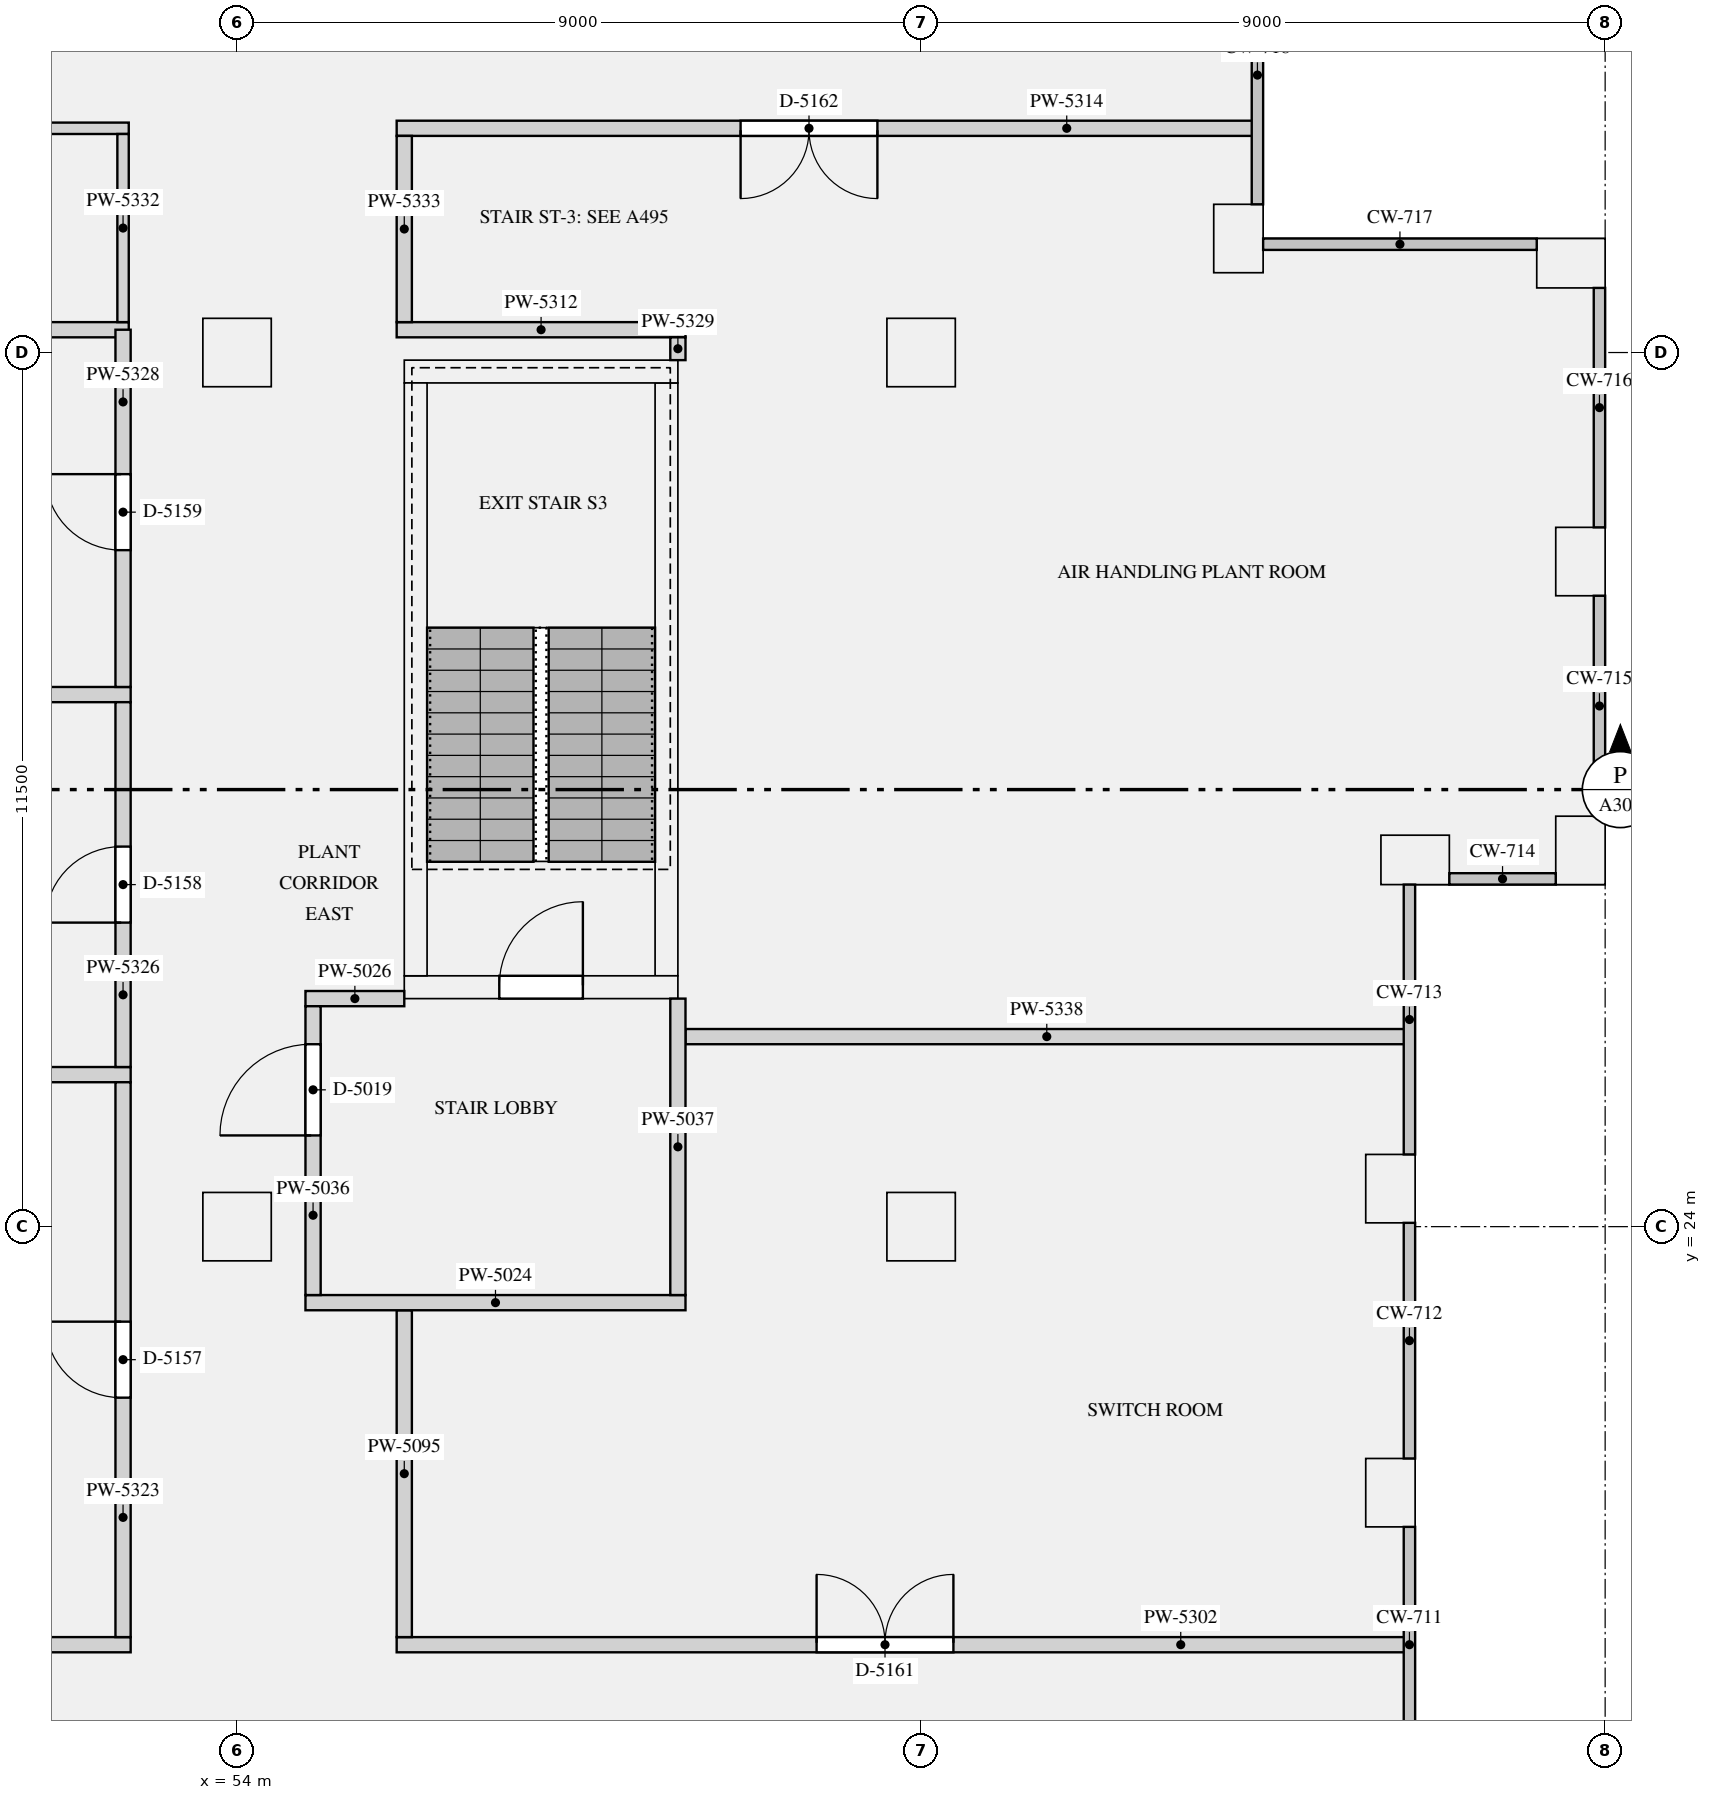
"""IFC4 building model, lengths in metres.
Left out: names, types, materials, properties, quantities, classifications, styles, units other than length and angle.
Written with IfcOpenShell. Run it as: python <this file> out.ifc"""

import sys

from ifc_helpers import new_model, si_unit, direction, frame, frame_2d, origin, origin_2d, place, context, subcontext, project, spatial, rectangle, extrude, element, fill, save


model = new_model("IFC4")
c1 = context("Model", 3, precision=1e-05, world=origin(), true_north=direction((0.0, 1.0)))
c2 = subcontext(c1, "Body", "Model", "MODEL_VIEW")
j1 = project(units=[si_unit("LENGTHUNIT", "METRE"), si_unit("PLANEANGLEUNIT", "RADIAN")], contexts=[c1])
p1 = place(None, origin())
s1 = spatial("IfcSite", under=j1, at=p1, CompositionType="ELEMENT")
p2 = place(p1, origin())
s2 = spatial("IfcBuilding", under=s1, at=p2, CompositionType="ELEMENT")
p3 = place(p2, frame((0.0, 0.0, 240.0)))
s3 = spatial("IfcBuildingStorey", under=s2, at=p3, CompositionType="ELEMENT", Elevation=240.0)
for number, where, z_axis, x_axis in (
    (1, (69.175, 20.5, 0.0), (0.0, 0.0, 1.0), (0.0, 1.0, 0.0)),
    (2, (69.175, 24.5, 0.0), (0.0, 0.0, 1.0), (0.0, 1.0, 0.0)),
    (3, (69.5, 28.825, 0.0), (0.0, 0.0, 1.0), (1.0, 0.0, 0.0)),
    (4, (71.675, 28.95, 0.0), (0.0, 0.0, 1.0), (0.0, 1.0, 0.0)),
    (5, (71.675, 32.75, 0.0), (0.0, 0.0, 1.0), (0.0, 1.0, 0.0)),
    (6, (71.55, 36.675, 0.0), (0.0, 0.0, 1.0), (-1.0, 0.0, 0.0)),
    (7, (67.175, 37.0, 0.0), (0.0, 0.0, 1.0), (0.0, 1.0, 0.0)),
):
    element("IfcColumn", number, at=place(p3, frame(where, z_axis=z_axis, x_axis=x_axis)), inside=s3, PredefinedType="USERDEFINED", context=c2, shape_type="SweptSolid", body=[
        extrude(rectangle(XDim=0.9, YDim=0.65, at=origin_2d()), origin(), (0.0, 0.0, 1.0), 4.2),
    ])
for number, where, z_axis, x_axis in (
    (8, (54.0, 24.0, 0.0), (0.0, 0.0, 1.0), (1.0, 0.0, 0.0)),
    (9, (63.0, 24.0, 0.0), (0.0, 0.0, 1.0), (1.0, 0.0, 0.0)),
    (10, (54.0, 35.5, 0.0), (0.0, 0.0, 1.0), (1.0, 0.0, 0.0)),
    (11, (63.0, 35.5, 0.0), (0.0, 0.0, 1.0), (1.0, 0.0, 0.0)),
):
    element("IfcColumn", number, at=place(p3, frame(where, z_axis=z_axis, x_axis=x_axis)), inside=s3, PredefinedType="COLUMN", context=c2, shape_type="SweptSolid", body=[
        extrude(rectangle(XDim=0.9, YDim=0.9, at=origin_2d()), origin(), (0.0, 0.0, 1.0), 4.2),
    ])
p4 = place(p3, frame((56.2, 27.15, 0.0), z_axis=(0.0, 0.0, 1.0), x_axis=(1.0, 0.0, 0.0)))
e12 = element("IfcWall", 12, at=p4, inside=s3, PredefinedType="SHEAR", context=c2, shape_type="SweptSolid", body=[
    extrude(rectangle(XDim=3.6, YDim=0.3, at=frame_2d((1.8, 0.0))), origin(), (0.0, 0.0, 1.0), 4.2),
])
p5 = place(p4, frame((1.25, 0.0, 0.0)))
e13 = element("IfcOpeningElement", 13, at=p5, cuts=e12, PredefinedType="OPENING", context=c2, shape_type="SweptSolid", body=[
    extrude(rectangle(XDim=1.1, YDim=2.1, at=frame_2d((0.55, 1.05))), frame((0.0, 0.16, 0.0), z_axis=(0.0, -1.0, 0.0), x_axis=(1.0, 0.0, 0.0)), (0.0, 0.0, 1.0), 0.32),
])
p6 = place(p3, frame((56.2, 35.25, 0.0), z_axis=(0.0, 0.0, 1.0), x_axis=(1.0, 0.0, 0.0)))
e14 = element("IfcWall", 14, at=p6, inside=s3, PredefinedType="SHEAR", context=c2, shape_type="SweptSolid", body=[
    extrude(rectangle(XDim=3.6, YDim=0.3, at=frame_2d((1.8, 0.0))), origin(), (0.0, 0.0, 1.0), 4.2),
])
for number, where, z_axis, x_axis in (
    (15, (56.35, 27.3, 0.0), (0.0, 0.0, 1.0), (0.0, 1.0, 0.0)),
    (16, (59.65, 27.3, 0.0), (0.0, 0.0, 1.0), (0.0, 1.0, 0.0)),
):
    element("IfcWall", number, at=place(p3, frame(where, z_axis=z_axis, x_axis=x_axis)), inside=s3, PredefinedType="SHEAR", context=c2, shape_type="SweptSolid", body=[
        extrude(rectangle(XDim=7.8, YDim=0.3, at=frame_2d((3.9, 0.0))), origin(), (0.0, 0.0, 1.0), 4.2),
    ])
p7 = place(p3, frame((54.9, 23.0, 0.0), z_axis=(0.0, 0.0, 1.0), x_axis=(1.0, 0.0, 0.0)))
e17 = element("IfcWall", 17, at=p7, inside=s3, PredefinedType="PARTITIONING", context=c2, shape_type="SweptSolid", body=[
    extrude(rectangle(XDim=5.0, YDim=0.2, at=frame_2d((2.5, 0.0))), origin(), (0.0, 0.0, 1.0), 3.85),
])
p8 = place(p3, frame((54.9, 27.0, 0.0), z_axis=(0.0, 0.0, 1.0), x_axis=(1.0, 0.0, 0.0)))
e18 = element("IfcWall", 18, at=p8, inside=s3, PredefinedType="PARTITIONING", context=c2, shape_type="SweptSolid", body=[
    extrude(rectangle(XDim=1.3, YDim=0.2, at=frame_2d((0.65, 0.0))), origin(), (0.0, 0.0, 1.0), 3.85),
])
p9 = place(p3, frame((55.0, 23.1, 0.0), z_axis=(0.0, 0.0, 1.0), x_axis=(0.0, 1.0, 0.0)))
e19 = element("IfcWall", 19, at=p9, inside=s3, PredefinedType="PARTITIONING", context=c2, shape_type="SweptSolid", body=[
    extrude(rectangle(XDim=3.8, YDim=0.2, at=frame_2d((1.9, 0.0))), origin(), (0.0, 0.0, 1.0), 3.85),
])
p10 = place(p9, frame((2.1, 0.0, 0.0)))
e20 = element("IfcOpeningElement", 20, at=p10, cuts=e19, PredefinedType="OPENING", context=c2, shape_type="SweptSolid", body=[
    extrude(rectangle(XDim=1.2, YDim=2.1, at=frame_2d((0.6, 1.05))), frame((0.0, 0.11, 0.0), z_axis=(0.0, -1.0, 0.0), x_axis=(1.0, 0.0, 0.0)), (0.0, 0.0, 1.0), 0.22),
])
p11 = place(p3, frame((59.8, 23.1, 0.0), z_axis=(0.0, 0.0, 1.0), x_axis=(0.0, 1.0, 0.0)))
e21 = element("IfcWall", 21, at=p11, inside=s3, PredefinedType="PARTITIONING", context=c2, shape_type="SweptSolid", body=[
    extrude(rectangle(XDim=3.9, YDim=0.2, at=frame_2d((1.95, 0.0))), origin(), (0.0, 0.0, 1.0), 3.85),
])
p12 = place(p3, frame((26.7, 18.5, 0.0), z_axis=(0.0, 0.0, 1.0), x_axis=(1.0, 0.0, 0.0)))
e22 = element("IfcWall", 22, at=p12, inside=s3, PredefinedType="PARTITIONING", context=c2, shape_type="SweptSolid", body=[
    extrude(rectangle(XDim=25.9, YDim=0.2, at=frame_2d((12.95, 0.0))), origin(), (0.0, 0.0, 1.0), 3.85),
])
p13 = place(p12, frame((5.2, 0.0, 0.0)))
e23 = element("IfcOpeningElement", 23, at=p13, cuts=e22, PredefinedType="OPENING", context=c2, shape_type="SweptSolid", body=[
    extrude(rectangle(XDim=1.0, YDim=2.1, at=frame_2d((0.5, 1.05))), frame((0.0, 0.11, 0.0), z_axis=(0.0, -1.0, 0.0), x_axis=(1.0, 0.0, 0.0)), (0.0, 0.0, 1.0), 0.22),
])
p14 = place(p12, frame((14.4, 0.0, 0.0)))
e24 = element("IfcOpeningElement", 24, at=p14, cuts=e22, PredefinedType="OPENING", context=c2, shape_type="SweptSolid", body=[
    extrude(rectangle(XDim=1.0, YDim=2.1, at=frame_2d((0.5, 1.05))), frame((0.0, 0.11, 0.0), z_axis=(0.0, -1.0, 0.0), x_axis=(1.0, 0.0, 0.0)), (0.0, 0.0, 1.0), 0.22),
])
p15 = place(p3, frame((56.1, 18.5, 0.0), z_axis=(0.0, 0.0, 1.0), x_axis=(1.0, 0.0, 0.0)))
e25 = element("IfcWall", 25, at=p15, inside=s3, PredefinedType="PARTITIONING", context=c2, shape_type="SweptSolid", body=[
    extrude(rectangle(XDim=13.307, YDim=0.2, at=frame_2d((6.653, 0.0))), origin(), (0.0, 0.0, 1.0), 3.85),
])
p16 = place(p15, frame((5.525, 0.0, 0.0)))
e26 = element("IfcOpeningElement", 26, at=p16, cuts=e25, PredefinedType="OPENING", context=c2, shape_type="SweptSolid", body=[
    extrude(rectangle(XDim=1.8, YDim=2.1, at=frame_2d((0.9, 1.05))), frame((0.0, 0.11, 0.0), z_axis=(0.0, -1.0, 0.0), x_axis=(1.0, 0.0, 0.0)), (0.0, 0.0, 1.0), 0.22),
])
p17 = place(p3, frame((45.096, 26.0, 0.0), z_axis=(0.0, 0.0, 1.0), x_axis=(1.0, 0.0, 0.0)))
e27 = element("IfcWall", 27, at=p17, inside=s3, PredefinedType="PARTITIONING", context=c2, shape_type="SweptSolid", body=[
    extrude(rectangle(XDim=7.504, YDim=0.2, at=frame_2d((3.752, 0.0))), origin(), (0.0, 0.0, 1.0), 3.85),
])
p18 = place(p3, frame((59.9, 26.5, 0.0), z_axis=(0.0, 0.0, 1.0), x_axis=(1.0, 0.0, 0.0)))
e28 = element("IfcWall", 28, at=p18, inside=s3, PredefinedType="PARTITIONING", context=c2, shape_type="SweptSolid", body=[
    extrude(rectangle(XDim=9.507, YDim=0.2, at=frame_2d((4.753, 0.0))), origin(), (0.0, 0.0, 1.0), 3.85),
])
p19 = place(p3, frame((45.096, 31.0, 0.0), z_axis=(0.0, 0.0, 1.0), x_axis=(1.0, 0.0, 0.0)))
e29 = element("IfcWall", 29, at=p19, inside=s3, PredefinedType="PARTITIONING", context=c2, shape_type="SweptSolid", body=[
    extrude(rectangle(XDim=7.504, YDim=0.2, at=frame_2d((3.752, 0.0))), origin(), (0.0, 0.0, 1.0), 3.85),
])
p20 = place(p3, frame((45.3, 35.8, 0.0), z_axis=(0.0, 0.0, 1.0), x_axis=(1.0, 0.0, 0.0)))
e30 = element("IfcWall", 30, at=p20, inside=s3, PredefinedType="PARTITIONING", context=c2, shape_type="SweptSolid", body=[
    extrude(rectangle(XDim=7.275, YDim=0.2, at=frame_2d((3.637, 0.0))), origin(), (0.0, 0.0, 1.0), 3.85),
])
p21 = place(p3, frame((56.1, 35.8, 0.0), z_axis=(0.0, 0.0, 1.0), x_axis=(1.0, 0.0, 0.0)))
e31 = element("IfcWall", 31, at=p21, inside=s3, PredefinedType="PARTITIONING", context=c2, shape_type="SweptSolid", body=[
    extrude(rectangle(XDim=3.8, YDim=0.2, at=frame_2d((1.9, 0.0))), origin(), (0.0, 0.0, 1.0), 3.85),
])
p22 = place(p3, frame((56.1, 38.45, 0.0), z_axis=(0.0, 0.0, 1.0), x_axis=(1.0, 0.0, 0.0)))
e32 = element("IfcWall", 32, at=p22, inside=s3, PredefinedType="PARTITIONING", context=c2, shape_type="SweptSolid", body=[
    extrude(rectangle(XDim=11.307, YDim=0.2, at=frame_2d((5.653, 0.0))), origin(), (0.0, 0.0, 1.0), 3.85),
])
p23 = place(p22, frame((4.525, 0.0, 0.0)))
e33 = element("IfcOpeningElement", 33, at=p23, cuts=e32, PredefinedType="OPENING", context=c2, shape_type="SweptSolid", body=[
    extrude(rectangle(XDim=1.8, YDim=2.1, at=frame_2d((0.9, 1.05))), frame((0.0, 0.11, 0.0), z_axis=(0.0, -1.0, 0.0), x_axis=(1.0, 0.0, 0.0)), (0.0, 0.0, 1.0), 0.22),
])
p24 = place(p3, frame((41.6, 38.45, 0.0), z_axis=(0.0, 0.0, 1.0), x_axis=(1.0, 0.0, 0.0)))
e34 = element("IfcWall", 34, at=p24, inside=s3, PredefinedType="PARTITIONING", context=c2, shape_type="SweptSolid", body=[
    extrude(rectangle(XDim=10.975, YDim=0.15, at=frame_2d((5.487, 0.0))), origin(), (0.0, 0.0, 1.0), 3.85),
])
p25 = place(p24, frame((4.95, 0.0, 0.0)))
e35 = element("IfcOpeningElement", 35, at=p25, cuts=e34, PredefinedType="OPENING", context=c2, shape_type="SweptSolid", body=[
    extrude(rectangle(XDim=0.9, YDim=2.1, at=frame_2d((0.45, 1.05))), frame((0.0, 0.085, 0.0), z_axis=(0.0, -1.0, 0.0), x_axis=(1.0, 0.0, 0.0)), (0.0, 0.0, 1.0), 0.17),
])
p26 = place(p3, frame((52.5, 18.6, 0.0), z_axis=(0.0, 0.0, 1.0), x_axis=(0.0, 1.0, 0.0)))
e36 = element("IfcWall", 36, at=p26, inside=s3, PredefinedType="PARTITIONING", context=c2, shape_type="SweptSolid", body=[
    extrude(rectangle(XDim=7.3, YDim=0.2, at=frame_2d((3.65, 0.0))), origin(), (0.0, 0.0, 1.0), 3.85),
])
p27 = place(p26, frame((3.15, 0.0, 0.0)))
e37 = element("IfcOpeningElement", 37, at=p27, cuts=e36, PredefinedType="OPENING", context=c2, shape_type="SweptSolid", body=[
    extrude(rectangle(XDim=1.0, YDim=2.1, at=frame_2d((0.5, 1.05))), frame((0.0, 0.11, 0.0), z_axis=(0.0, -1.0, 0.0), x_axis=(1.0, 0.0, 0.0)), (0.0, 0.0, 1.0), 0.22),
])
p28 = place(p3, frame((56.2, 18.6, 0.0), z_axis=(0.0, 0.0, 1.0), x_axis=(0.0, 1.0, 0.0)))
e38 = element("IfcWall", 38, at=p28, inside=s3, PredefinedType="PARTITIONING", context=c2, shape_type="SweptSolid", body=[
    extrude(rectangle(XDim=4.3, YDim=0.2, at=frame_2d((2.15, 0.0))), origin(), (0.0, 0.0, 1.0), 3.85),
])
p29 = place(p3, frame((52.5, 26.1, 0.0), z_axis=(0.0, 0.0, 1.0), x_axis=(0.0, 1.0, 0.0)))
e39 = element("IfcWall", 39, at=p29, inside=s3, PredefinedType="PARTITIONING", context=c2, shape_type="SweptSolid", body=[
    extrude(rectangle(XDim=4.8, YDim=0.2, at=frame_2d((2.4, 0.0))), origin(), (0.0, 0.0, 1.0), 3.85),
])
p30 = place(p29, frame((1.9, 0.0, 0.0)))
e40 = element("IfcOpeningElement", 40, at=p30, cuts=e39, PredefinedType="OPENING", context=c2, shape_type="SweptSolid", body=[
    extrude(rectangle(XDim=1.0, YDim=2.1, at=frame_2d((0.5, 1.05))), frame((0.0, 0.11, 0.0), z_axis=(0.0, -1.0, 0.0), x_axis=(1.0, 0.0, 0.0)), (0.0, 0.0, 1.0), 0.22),
])
p31 = place(p3, frame((52.5, 31.1, 0.0), z_axis=(0.0, 0.0, 1.0), x_axis=(0.0, 1.0, 0.0)))
e41 = element("IfcWall", 41, at=p31, inside=s3, PredefinedType="PARTITIONING", context=c2, shape_type="SweptSolid", body=[
    extrude(rectangle(XDim=4.7, YDim=0.2, at=frame_2d((2.35, 0.0))), origin(), (0.0, 0.0, 1.0), 3.85),
])
p32 = place(p31, frame((1.8, 0.0, 0.0)))
e42 = element("IfcOpeningElement", 42, at=p32, cuts=e41, PredefinedType="OPENING", context=c2, shape_type="SweptSolid", body=[
    extrude(rectangle(XDim=1.0, YDim=2.1, at=frame_2d((0.5, 1.05))), frame((0.0, 0.11, 0.0), z_axis=(0.0, -1.0, 0.0), x_axis=(1.0, 0.0, 0.0)), (0.0, 0.0, 1.0), 0.22),
])
p33 = place(p3, frame((59.8, 35.4, 0.0), z_axis=(0.0, 0.0, 1.0), x_axis=(0.0, 1.0, 0.0)))
e43 = element("IfcWall", 43, at=p33, inside=s3, PredefinedType="PARTITIONING", context=c2, shape_type="SweptSolid", body=[
    extrude(rectangle(XDim=0.3, YDim=0.2, at=frame_2d((0.15, 0.0))), origin(), (0.0, 0.0, 1.0), 3.85),
])
p34 = place(p3, frame((52.5, 35.9, 0.0), z_axis=(0.0, 0.0, 1.0), x_axis=(0.0, 1.0, 0.0)))
e44 = element("IfcWall", 44, at=p34, inside=s3, PredefinedType="PARTITIONING", context=c2, shape_type="SweptSolid", body=[
    extrude(rectangle(XDim=2.475, YDim=0.15, at=frame_2d((1.238, 0.0))), origin(), (0.0, 0.0, 1.0), 3.85),
])
p35 = place(p3, frame((56.2, 35.9, 0.0), z_axis=(0.0, 0.0, 1.0), x_axis=(0.0, 1.0, 0.0)))
e45 = element("IfcWall", 45, at=p35, inside=s3, PredefinedType="PARTITIONING", context=c2, shape_type="SweptSolid", body=[
    extrude(rectangle(XDim=2.45, YDim=0.2, at=frame_2d((1.225, 0.0))), origin(), (0.0, 0.0, 1.0), 3.85),
])
p36 = place(p5, origin())
e46 = element("IfcDoor", 46, at=p36, inside=s3, OperationType="SINGLE_SWING_RIGHT", PredefinedType="DOOR", context=c2, shape_type="SweptSolid", body=[
    extrude(rectangle(XDim=1.1, YDim=2.1, at=frame_2d((0.55, 1.05))), frame((0.0, 0.025, 0.0), z_axis=(0.0, -1.0, 0.0), x_axis=(1.0, 0.0, 0.0)), (0.0, 0.0, 1.0), 0.05),
])
fill(e13, e46)
p37 = place(p10, origin())
e47 = element("IfcDoor", 47, at=p37, inside=s3, OperationType="SINGLE_SWING_LEFT", PredefinedType="DOOR", context=c2, shape_type="SweptSolid", body=[
    extrude(rectangle(XDim=1.2, YDim=2.1, at=frame_2d((0.6, 1.05))), frame((0.0, 0.025, 0.0), z_axis=(0.0, -1.0, 0.0), x_axis=(1.0, 0.0, 0.0)), (0.0, 0.0, 1.0), 0.05),
])
fill(e20, e47)
p38 = place(p27, origin())
e48 = element("IfcDoor", 48, at=p38, inside=s3, OperationType="SINGLE_SWING_RIGHT", PredefinedType="DOOR", context=c2, shape_type="SweptSolid", body=[
    extrude(rectangle(XDim=1.0, YDim=2.1, at=frame_2d((0.5, 1.05))), frame((0.0, 0.025, 0.0), z_axis=(0.0, -1.0, 0.0), x_axis=(1.0, 0.0, 0.0)), (0.0, 0.0, 1.0), 0.05),
])
fill(e37, e48)
p39 = place(p30, origin())
e49 = element("IfcDoor", 49, at=p39, inside=s3, OperationType="SINGLE_SWING_LEFT", PredefinedType="DOOR", context=c2, shape_type="SweptSolid", body=[
    extrude(rectangle(XDim=1.0, YDim=2.1, at=frame_2d((0.5, 1.05))), frame((0.0, 0.025, 0.0), z_axis=(0.0, -1.0, 0.0), x_axis=(1.0, 0.0, 0.0)), (0.0, 0.0, 1.0), 0.05),
])
fill(e40, e49)
p40 = place(p32, origin())
e50 = element("IfcDoor", 50, at=p40, inside=s3, OperationType="SINGLE_SWING_RIGHT", PredefinedType="DOOR", context=c2, shape_type="SweptSolid", body=[
    extrude(rectangle(XDim=1.0, YDim=2.1, at=frame_2d((0.5, 1.05))), frame((0.0, 0.025, 0.0), z_axis=(0.0, -1.0, 0.0), x_axis=(1.0, 0.0, 0.0)), (0.0, 0.0, 1.0), 0.05),
])
fill(e42, e50)
p41 = place(p16, origin())
e51 = element("IfcDoor", 51, at=p41, inside=s3, OperationType="DOUBLE_DOOR_SINGLE_SWING", PredefinedType="DOOR", context=c2, shape_type="SweptSolid", body=[
    extrude(rectangle(XDim=1.8, YDim=2.1, at=frame_2d((0.9, 1.05))), frame((0.0, 0.025, 0.0), z_axis=(0.0, -1.0, 0.0), x_axis=(1.0, 0.0, 0.0)), (0.0, 0.0, 1.0), 0.05),
])
fill(e26, e51)
p42 = place(p23, frame((1.8, 0.0, 0.0), z_axis=(0.0, 0.0, 1.0), x_axis=(-1.0, 0.0, 0.0)))
e52 = element("IfcDoor", 52, at=p42, inside=s3, OperationType="DOUBLE_DOOR_SINGLE_SWING", PredefinedType="DOOR", context=c2, shape_type="SweptSolid", body=[
    extrude(rectangle(XDim=1.8, YDim=2.1, at=frame_2d((0.9, 1.05))), frame((0.0, 0.025, 0.0), z_axis=(0.0, -1.0, 0.0), x_axis=(1.0, 0.0, 0.0)), (0.0, 0.0, 1.0), 0.05),
])
fill(e33, e52)
save(model, sys.argv[1])
